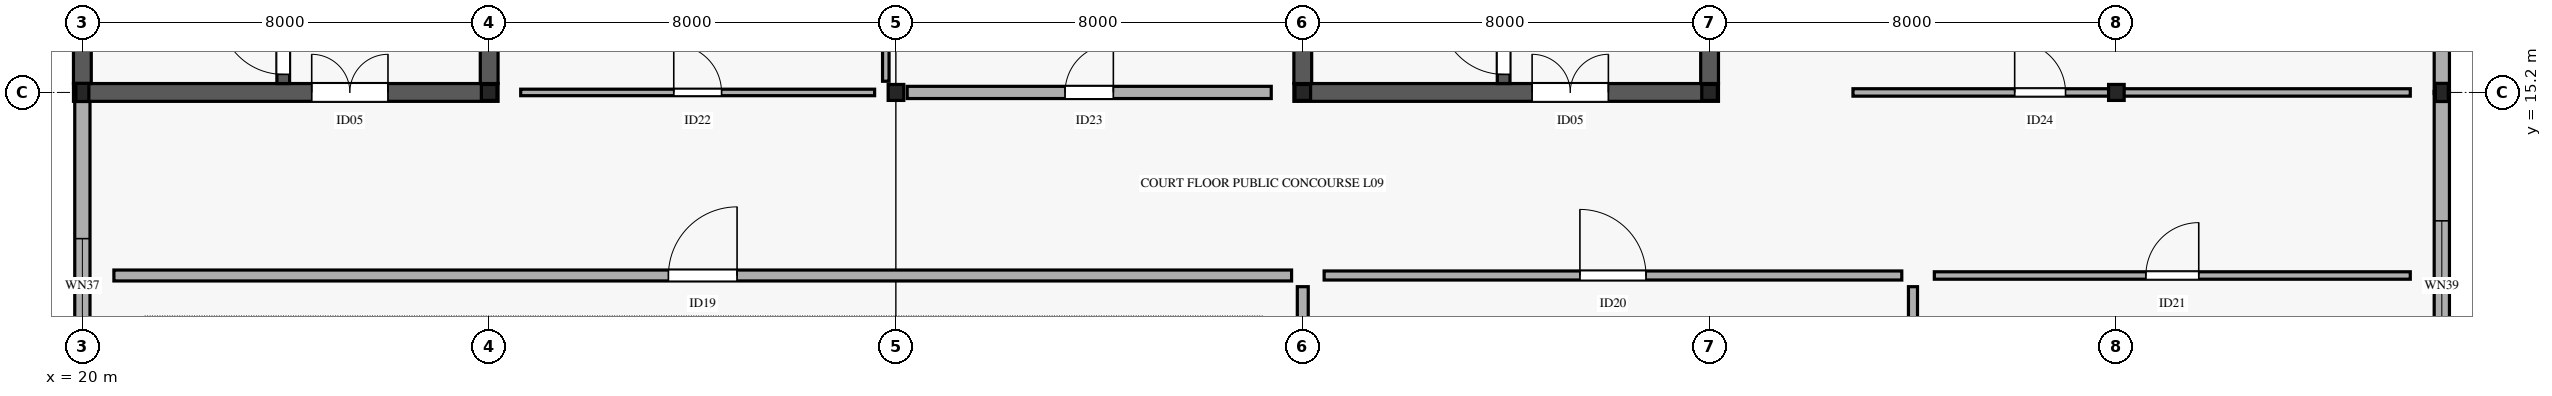
"""IFC4 building model, lengths in metres.
Left out: names, types, materials, properties, quantities, classifications, styles, units other than length and angle.
Written with IfcOpenShell. Run it as: python <this file> out.ifc"""

import sys

from ifc_helpers import new_model, si_unit, direction, frame, frame_2d, origin, origin_2d, place, context, subcontext, project, spatial, rectangle, i_section, extrude, element, fill, save


model = new_model("IFC4")
c1 = context("Model", 3, precision=1e-05, world=origin(), true_north=direction((0.0, 1.0)))
c2 = subcontext(c1, "Body", "Model", "MODEL_VIEW")
j1 = project(units=[si_unit("LENGTHUNIT", "METRE"), si_unit("PLANEANGLEUNIT", "RADIAN")], contexts=[c1])
p1 = place(None, origin())
s1 = spatial("IfcSite", under=j1, at=p1, CompositionType="ELEMENT")
p2 = place(p1, origin())
s2 = spatial("IfcBuilding", under=s1, at=p2, CompositionType="ELEMENT")
p3 = place(p2, frame((0.0, 0.0, 42.0)))
s3 = spatial("IfcBuildingStorey", under=s2, at=p3, CompositionType="ELEMENT", Elevation=42.0)
p4 = place(p3, frame((20.0, 15.2, 0.0), z_axis=(0.0, 0.0, 1.0), x_axis=(1.0, 0.0, 0.0)))
e1 = element("IfcColumn", 1, at=p4, inside=s3, PredefinedType="COLUMN", context=c2, shape_type="SweptSolid", body=[
    extrude(i_section(OverallWidth=0.255, OverallDepth=0.357, WebThickness=0.01, FlangeThickness=0.018, FilletRadius=0.015, at=origin_2d()), origin(), (0.0, 0.0, 1.0), 3.995),
])
for number, where, z_axis, x_axis in (
    (2, (28.0, 15.2, 0.0), (0.0, 0.0, 1.0), (1.0, 0.0, 0.0)),
    (3, (36.0, 15.2, 0.0), (0.0, 0.0, 1.0), (1.0, 0.0, 0.0)),
    (4, (44.0, 15.2, 0.0), (0.0, 0.0, 1.0), (1.0, 0.0, 0.0)),
    (5, (52.0, 15.2, 0.0), (0.0, 0.0, 1.0), (1.0, 0.0, 0.0)),
    (6, (60.0, 15.2, 0.0), (0.0, 0.0, 1.0), (1.0, 0.0, 0.0)),
):
    element("IfcColumn", number, at=place(p3, frame(where, z_axis=z_axis, x_axis=x_axis)), inside=s3, PredefinedType="COLUMN", context=c2, shape_type="SweptSolid", body=[
        extrude(i_section(OverallWidth=0.307, OverallDepth=0.314, WebThickness=0.012, FlangeThickness=0.019, FilletRadius=0.015, at=origin_2d()), origin(), (0.0, 0.0, 1.0), 3.995),
    ])
p5 = place(p3, frame((66.4, 15.2, 0.0), z_axis=(0.0, 0.0, 1.0), x_axis=(1.0, 0.0, 0.0)))
e7 = element("IfcColumn", 7, at=p5, inside=s3, PredefinedType="COLUMN", context=c2, shape_type="SweptSolid", body=[
    extrude(i_section(OverallWidth=0.255, OverallDepth=0.357, WebThickness=0.01, FlangeThickness=0.018, FilletRadius=0.015, at=origin_2d()), origin(), (0.0, 0.0, 1.0), 3.995),
])
p6 = place(p3, frame((20.0, 7.58, 0.0), z_axis=(0.0, 0.0, 1.0), x_axis=(0.0, 1.0, 0.0)))
e8 = element("IfcWall", 8, at=p6, inside=s3, PredefinedType="STANDARD", context=c2, shape_type="SweptSolid", body=[
    extrude(rectangle(XDim=7.64, YDim=0.3, at=frame_2d((3.82, 0.0))), origin(), (0.0, 0.0, 1.0), 3.06),
])
p7 = place(p6, frame((2.895, 0.0, 0.75)))
e9 = element("IfcOpeningElement", 9, at=p7, cuts=e8, PredefinedType="OPENING", context=c2, shape_type="SweptSolid", body=[
    extrude(rectangle(XDim=1.85, YDim=1.9, at=frame_2d((0.925, 0.95))), frame((0.0, 0.16, 0.0), z_axis=(0.0, -1.0, 0.0), x_axis=(1.0, 0.0, 0.0)), (0.0, 0.0, 1.0), 0.32),
])
p8 = place(p3, frame((66.4, 22.82, 0.0), z_axis=(0.0, 0.0, 1.0), x_axis=(0.0, -1.0, 0.0)))
e10 = element("IfcWall", 10, at=p8, inside=s3, PredefinedType="STANDARD", context=c2, shape_type="SweptSolid", body=[
    extrude(rectangle(XDim=7.64, YDim=0.3, at=frame_2d((3.82, 0.0))), origin(), (0.0, 0.0, 1.0), 3.06),
])
p9 = place(p8, frame((2.745, 0.0, 0.75)))
e11 = element("IfcOpeningElement", 11, at=p9, cuts=e10, PredefinedType="OPENING", context=c2, shape_type="SweptSolid", body=[
    extrude(rectangle(XDim=2.15, YDim=1.9, at=frame_2d((1.075, 0.95))), frame((0.0, 0.16, 0.0), z_axis=(0.0, -1.0, 0.0), x_axis=(1.0, 0.0, 0.0)), (0.0, 0.0, 1.0), 0.32),
])
p10 = place(p3, frame((66.4, 15.22, 0.0), z_axis=(0.0, 0.0, 1.0), x_axis=(0.0, -1.0, 0.0)))
e12 = element("IfcWall", 12, at=p10, inside=s3, PredefinedType="STANDARD", context=c2, shape_type="SweptSolid", body=[
    extrude(rectangle(XDim=7.64, YDim=0.3, at=frame_2d((3.82, 0.0))), origin(), (0.0, 0.0, 1.0), 3.06),
])
p11 = place(p10, frame((2.545, 0.0, 0.75)))
e13 = element("IfcOpeningElement", 13, at=p11, cuts=e12, PredefinedType="OPENING", context=c2, shape_type="SweptSolid", body=[
    extrude(rectangle(XDim=2.55, YDim=1.9, at=frame_2d((1.275, 0.95))), frame((0.0, 0.16, 0.0), z_axis=(0.0, -1.0, 0.0), x_axis=(1.0, 0.0, 0.0)), (0.0, 0.0, 1.0), 0.32),
])
p12 = place(p3, frame((19.825, 15.2, 0.0), z_axis=(0.0, 0.0, 1.0), x_axis=(1.0, 0.0, 0.0)))
e14 = element("IfcWall", 14, at=p12, inside=s3, PredefinedType="SHEAR", context=c2, shape_type="SweptSolid", body=[
    extrude(rectangle(XDim=8.35, YDim=0.35, at=frame_2d((4.175, 0.0))), origin(), (0.0, 0.0, 1.0), 3.99),
])
p13 = place(p12, frame((4.685, 0.0, 0.0)))
e15 = element("IfcOpeningElement", 15, at=p13, cuts=e14, PredefinedType="OPENING", context=c2, shape_type="SweptSolid", body=[
    extrude(rectangle(XDim=1.5, YDim=2.2, at=frame_2d((0.75, 1.1))), frame((0.0, 0.185, 0.0), z_axis=(0.0, -1.0, 0.0), x_axis=(1.0, 0.0, 0.0)), (0.0, 0.0, 1.0), 0.37),
])
for number, where, z_axis, x_axis in (
    (16, (20.0, 15.375, 0.0), (0.0, 0.0, 1.0), (0.0, 1.0, 0.0)),
    (17, (28.0, 15.375, 0.0), (0.0, 0.0, 1.0), (0.0, 1.0, 0.0)),
):
    element("IfcWall", number, at=place(p3, frame(where, z_axis=z_axis, x_axis=x_axis)), inside=s3, PredefinedType="SHEAR", context=c2, shape_type="SweptSolid", body=[
        extrude(rectangle(XDim=7.25, YDim=0.35, at=frame_2d((3.625, 0.0))), origin(), (0.0, 0.0, 1.0), 3.99),
    ])
p14 = place(p3, frame((23.95, 15.375, 0.0), z_axis=(0.0, 0.0, 1.0), x_axis=(0.0, 1.0, 0.0)))
e18 = element("IfcWall", 18, at=p14, inside=s3, PredefinedType="SHEAR", context=c2, shape_type="SweptSolid", body=[
    extrude(rectangle(XDim=7.25, YDim=0.25, at=frame_2d((3.625, 0.0))), origin(), (0.0, 0.0, 1.0), 3.99),
])
p15 = place(p14, frame((0.18, 0.0, 0.0)))
e19 = element("IfcOpeningElement", 19, at=p15, cuts=e18, PredefinedType="OPENING", context=c2, shape_type="SweptSolid", body=[
    extrude(rectangle(XDim=1.25, YDim=2.2, at=frame_2d((0.625, 1.1))), frame((0.0, 0.135, 0.0), z_axis=(0.0, -1.0, 0.0), x_axis=(1.0, 0.0, 0.0)), (0.0, 0.0, 1.0), 0.27),
])
p16 = place(p3, frame((43.825, 15.2, 0.0), z_axis=(0.0, 0.0, 1.0), x_axis=(1.0, 0.0, 0.0)))
e20 = element("IfcWall", 20, at=p16, inside=s3, PredefinedType="SHEAR", context=c2, shape_type="SweptSolid", body=[
    extrude(rectangle(XDim=8.35, YDim=0.35, at=frame_2d((4.175, 0.0))), origin(), (0.0, 0.0, 1.0), 3.99),
])
p17 = place(p16, frame((4.685, 0.0, 0.0)))
e21 = element("IfcOpeningElement", 21, at=p17, cuts=e20, PredefinedType="OPENING", context=c2, shape_type="SweptSolid", body=[
    extrude(rectangle(XDim=1.5, YDim=2.2, at=frame_2d((0.75, 1.1))), frame((0.0, 0.185, 0.0), z_axis=(0.0, -1.0, 0.0), x_axis=(1.0, 0.0, 0.0)), (0.0, 0.0, 1.0), 0.37),
])
for number, where, z_axis, x_axis in (
    (22, (44.0, 15.375, 0.0), (0.0, 0.0, 1.0), (0.0, 1.0, 0.0)),
    (23, (52.0, 15.375, 0.0), (0.0, 0.0, 1.0), (0.0, 1.0, 0.0)),
):
    element("IfcWall", number, at=place(p3, frame(where, z_axis=z_axis, x_axis=x_axis)), inside=s3, PredefinedType="SHEAR", context=c2, shape_type="SweptSolid", body=[
        extrude(rectangle(XDim=7.25, YDim=0.35, at=frame_2d((3.625, 0.0))), origin(), (0.0, 0.0, 1.0), 3.99),
    ])
p18 = place(p3, frame((47.95, 15.375, 0.0), z_axis=(0.0, 0.0, 1.0), x_axis=(0.0, 1.0, 0.0)))
e24 = element("IfcWall", 24, at=p18, inside=s3, PredefinedType="SHEAR", context=c2, shape_type="SweptSolid", body=[
    extrude(rectangle(XDim=7.25, YDim=0.25, at=frame_2d((3.625, 0.0))), origin(), (0.0, 0.0, 1.0), 3.99),
])
p19 = place(p18, frame((0.18, 0.0, 0.0)))
e25 = element("IfcOpeningElement", 25, at=p19, cuts=e24, PredefinedType="OPENING", context=c2, shape_type="SweptSolid", body=[
    extrude(rectangle(XDim=1.25, YDim=2.2, at=frame_2d((0.625, 1.1))), frame((0.0, 0.135, 0.0), z_axis=(0.0, -1.0, 0.0), x_axis=(1.0, 0.0, 0.0)), (0.0, 0.0, 1.0), 0.27),
])
p20 = place(p3, frame((20.62, 11.6, 0.0), z_axis=(0.0, 0.0, 1.0), x_axis=(1.0, 0.0, 0.0)))
e26 = element("IfcWall", 26, at=p20, inside=s3, PredefinedType="PARTITIONING", context=c2, shape_type="SweptSolid", body=[
    extrude(rectangle(XDim=23.16, YDim=0.215, at=frame_2d((11.58, 0.0))), origin(), (0.0, 0.0, 1.0), 2.85),
])
p21 = place(p20, frame((10.905, 0.0, 0.0)))
e27 = element("IfcOpeningElement", 27, at=p21, cuts=e26, PredefinedType="OPENING", context=c2, shape_type="SweptSolid", body=[
    extrude(rectangle(XDim=1.35, YDim=2.25, at=frame_2d((0.675, 1.125))), frame((0.0, 0.117, 0.0), z_axis=(0.0, -1.0, 0.0), x_axis=(1.0, 0.0, 0.0)), (0.0, 0.0, 1.0), 0.235),
])
p22 = place(p3, frame((44.0, 0.62, 0.0), z_axis=(0.0, 0.0, 1.0), x_axis=(0.0, 1.0, 0.0)))
e28 = element("IfcWall", 28, at=p22, inside=s3, PredefinedType="PARTITIONING", context=c2, shape_type="SweptSolid", body=[
    extrude(rectangle(XDim=10.76, YDim=0.215, at=frame_2d((5.38, 0.0))), origin(), (0.0, 0.0, 1.0), 2.85),
])
p23 = place(p3, frame((44.42, 11.6, 0.0), z_axis=(0.0, 0.0, 1.0), x_axis=(1.0, 0.0, 0.0)))
e29 = element("IfcWall", 29, at=p23, inside=s3, PredefinedType="PARTITIONING", context=c2, shape_type="SweptSolid", body=[
    extrude(rectangle(XDim=11.36, YDim=0.178, at=frame_2d((5.68, 0.0))), origin(), (0.0, 0.0, 1.0), 2.85),
])
p24 = place(p23, frame((5.03, 0.0, 0.0)))
e30 = element("IfcOpeningElement", 30, at=p24, cuts=e29, PredefinedType="OPENING", context=c2, shape_type="SweptSolid", body=[
    extrude(rectangle(XDim=1.3, YDim=2.2, at=frame_2d((0.65, 1.1))), frame((0.0, 0.099, 0.0), z_axis=(0.0, -1.0, 0.0), x_axis=(1.0, 0.0, 0.0)), (0.0, 0.0, 1.0), 0.198),
])
p25 = place(p3, frame((56.0, 0.62, 0.0), z_axis=(0.0, 0.0, 1.0), x_axis=(0.0, 1.0, 0.0)))
e31 = element("IfcWall", 31, at=p25, inside=s3, PredefinedType="PARTITIONING", context=c2, shape_type="SweptSolid", body=[
    extrude(rectangle(XDim=10.76, YDim=0.178, at=frame_2d((5.38, 0.0))), origin(), (0.0, 0.0, 1.0), 2.85),
])
p26 = place(p3, frame((56.42, 11.6, 0.0), z_axis=(0.0, 0.0, 1.0), x_axis=(1.0, 0.0, 0.0)))
e32 = element("IfcWall", 32, at=p26, inside=s3, PredefinedType="PARTITIONING", context=c2, shape_type="SweptSolid", body=[
    extrude(rectangle(XDim=9.36, YDim=0.146, at=frame_2d((4.68, 0.0))), origin(), (0.0, 0.0, 1.0), 2.85),
])
p27 = place(p26, frame((4.16, 0.0, 0.0)))
e33 = element("IfcOpeningElement", 33, at=p27, cuts=e32, PredefinedType="OPENING", context=c2, shape_type="SweptSolid", body=[
    extrude(rectangle(XDim=1.04, YDim=2.2, at=frame_2d((0.52, 1.1))), frame((0.0, 0.083, 0.0), z_axis=(0.0, -1.0, 0.0), x_axis=(1.0, 0.0, 0.0)), (0.0, 0.0, 1.0), 0.166),
])
p28 = place(p3, frame((28.62, 15.2, 0.0), z_axis=(0.0, 0.0, 1.0), x_axis=(1.0, 0.0, 0.0)))
e34 = element("IfcWall", 34, at=p28, inside=s3, PredefinedType="PARTITIONING", context=c2, shape_type="SweptSolid", body=[
    extrude(rectangle(XDim=6.96, YDim=0.128, at=frame_2d((3.48, 0.0))), origin(), (0.0, 0.0, 1.0), 2.85),
])
p29 = place(p28, frame((3.01, 0.0, 0.0)))
e35 = element("IfcOpeningElement", 35, at=p29, cuts=e34, PredefinedType="OPENING", context=c2, shape_type="SweptSolid", body=[
    extrude(rectangle(XDim=0.94, YDim=2.2, at=frame_2d((0.47, 1.1))), frame((0.0, 0.074, 0.0), z_axis=(0.0, -1.0, 0.0), x_axis=(1.0, 0.0, 0.0)), (0.0, 0.0, 1.0), 0.148),
])
p30 = place(p3, frame((35.8, 15.42, 0.0), z_axis=(0.0, 0.0, 1.0), x_axis=(0.0, 1.0, 0.0)))
e36 = element("IfcWall", 36, at=p30, inside=s3, PredefinedType="PARTITIONING", context=c2, shape_type="SweptSolid", body=[
    extrude(rectangle(XDim=6.76, YDim=0.128, at=frame_2d((3.38, 0.0))), origin(), (0.0, 0.0, 1.0), 2.85),
])
p31 = place(p3, frame((36.22, 15.2, 0.0), z_axis=(0.0, 0.0, 1.0), x_axis=(1.0, 0.0, 0.0)))
e37 = element("IfcWall", 37, at=p31, inside=s3, PredefinedType="PARTITIONING", context=c2, shape_type="SweptSolid", body=[
    extrude(rectangle(XDim=7.16, YDim=0.24, at=frame_2d((3.58, 0.0))), origin(), (0.0, 0.0, 1.0), 2.85),
])
p32 = place(p31, frame((3.105, 0.0, 0.0)))
e38 = element("IfcOpeningElement", 38, at=p32, cuts=e37, PredefinedType="OPENING", context=c2, shape_type="SweptSolid", body=[
    extrude(rectangle(XDim=0.95, YDim=2.15, at=frame_2d((0.475, 1.075))), frame((0.0, 0.13, 0.0), z_axis=(0.0, -1.0, 0.0), x_axis=(1.0, 0.0, 0.0)), (0.0, 0.0, 1.0), 0.26),
])
p33 = place(p3, frame((54.82, 15.2, 0.0), z_axis=(0.0, 0.0, 1.0), x_axis=(1.0, 0.0, 0.0)))
e39 = element("IfcWall", 39, at=p33, inside=s3, PredefinedType="PARTITIONING", context=c2, shape_type="SweptSolid", body=[
    extrude(rectangle(XDim=10.96, YDim=0.146, at=frame_2d((5.48, 0.0))), origin(), (0.0, 0.0, 1.0), 2.85),
])
p34 = place(p33, frame((3.18, 0.0, 0.0)))
e40 = element("IfcOpeningElement", 40, at=p34, cuts=e39, PredefinedType="OPENING", context=c2, shape_type="SweptSolid", body=[
    extrude(rectangle(XDim=1.0, YDim=2.15, at=frame_2d((0.5, 1.075))), frame((0.0, 0.083, 0.0), z_axis=(0.0, -1.0, 0.0), x_axis=(1.0, 0.0, 0.0)), (0.0, 0.0, 1.0), 0.166),
])
p35 = place(p7, origin())
e41 = element("IfcWindow", 41, at=p35, inside=s3, PartitioningType="SINGLE_PANEL", PredefinedType="WINDOW", context=c2, shape_type="SweptSolid", body=[
    extrude(rectangle(XDim=1.85, YDim=1.9, at=frame_2d((0.925, 0.95))), frame((0.0, 0.03, 0.0), z_axis=(0.0, -1.0, 0.0), x_axis=(1.0, 0.0, 0.0)), (0.0, 0.0, 1.0), 0.06),
])
fill(e9, e41)
p36 = place(p11, origin())
e42 = element("IfcWindow", 42, at=p36, inside=s3, PartitioningType="SINGLE_PANEL", PredefinedType="WINDOW", context=c2, shape_type="SweptSolid", body=[
    extrude(rectangle(XDim=2.55, YDim=1.9, at=frame_2d((1.275, 0.95))), frame((0.0, 0.03, 0.0), z_axis=(0.0, -1.0, 0.0), x_axis=(1.0, 0.0, 0.0)), (0.0, 0.0, 1.0), 0.06),
])
fill(e13, e42)
p37 = place(p15, origin())
e43 = element("IfcDoor", 43, at=p37, inside=s3, OperationType="SINGLE_SWING_RIGHT", PredefinedType="DOOR", context=c2, shape_type="SweptSolid", body=[
    extrude(rectangle(XDim=1.25, YDim=2.2, at=frame_2d((0.625, 1.1))), frame((0.0, 0.025, 0.0), z_axis=(0.0, -1.0, 0.0), x_axis=(1.0, 0.0, 0.0)), (0.0, 0.0, 1.0), 0.05),
])
fill(e19, e43)
p38 = place(p13, origin())
e44 = element("IfcDoor", 44, at=p38, inside=s3, OperationType="DOUBLE_DOOR_SINGLE_SWING", PredefinedType="DOOR", context=c2, shape_type="SweptSolid", body=[
    extrude(rectangle(XDim=1.5, YDim=2.2, at=frame_2d((0.75, 1.1))), frame((0.0, 0.025, 0.0), z_axis=(0.0, -1.0, 0.0), x_axis=(1.0, 0.0, 0.0)), (0.0, 0.0, 1.0), 0.05),
])
fill(e15, e44)
p39 = place(p19, origin())
e45 = element("IfcDoor", 45, at=p39, inside=s3, OperationType="SINGLE_SWING_RIGHT", PredefinedType="DOOR", context=c2, shape_type="SweptSolid", body=[
    extrude(rectangle(XDim=1.25, YDim=2.2, at=frame_2d((0.625, 1.1))), frame((0.0, 0.025, 0.0), z_axis=(0.0, -1.0, 0.0), x_axis=(1.0, 0.0, 0.0)), (0.0, 0.0, 1.0), 0.05),
])
fill(e25, e45)
p40 = place(p17, origin())
e46 = element("IfcDoor", 46, at=p40, inside=s3, OperationType="DOUBLE_DOOR_SINGLE_SWING", PredefinedType="DOOR", context=c2, shape_type="SweptSolid", body=[
    extrude(rectangle(XDim=1.5, YDim=2.2, at=frame_2d((0.75, 1.1))), frame((0.0, 0.025, 0.0), z_axis=(0.0, -1.0, 0.0), x_axis=(1.0, 0.0, 0.0)), (0.0, 0.0, 1.0), 0.05),
])
fill(e21, e46)
p41 = place(p21, origin())
e47 = element("IfcDoor", 47, at=p41, inside=s3, OperationType="SINGLE_SWING_RIGHT", PredefinedType="DOOR", context=c2, shape_type="SweptSolid", body=[
    extrude(rectangle(XDim=1.35, YDim=2.25, at=frame_2d((0.675, 1.125))), frame((0.0, 0.025, 0.0), z_axis=(0.0, -1.0, 0.0), x_axis=(1.0, 0.0, 0.0)), (0.0, 0.0, 1.0), 0.05),
])
fill(e27, e47)
p42 = place(p24, origin())
e48 = element("IfcDoor", 48, at=p42, inside=s3, OperationType="SINGLE_SWING_LEFT", PredefinedType="DOOR", context=c2, shape_type="SweptSolid", body=[
    extrude(rectangle(XDim=1.3, YDim=2.2, at=frame_2d((0.65, 1.1))), frame((0.0, 0.025, 0.0), z_axis=(0.0, -1.0, 0.0), x_axis=(1.0, 0.0, 0.0)), (0.0, 0.0, 1.0), 0.05),
])
fill(e30, e48)
p43 = place(p27, origin())
e49 = element("IfcDoor", 49, at=p43, inside=s3, OperationType="SINGLE_SWING_RIGHT", PredefinedType="DOOR", context=c2, shape_type="SweptSolid", body=[
    extrude(rectangle(XDim=1.04, YDim=2.2, at=frame_2d((0.52, 1.1))), frame((0.0, 0.025, 0.0), z_axis=(0.0, -1.0, 0.0), x_axis=(1.0, 0.0, 0.0)), (0.0, 0.0, 1.0), 0.05),
])
fill(e33, e49)
p44 = place(p29, origin())
e50 = element("IfcDoor", 50, at=p44, inside=s3, OperationType="SINGLE_SWING_LEFT", PredefinedType="DOOR", context=c2, shape_type="SweptSolid", body=[
    extrude(rectangle(XDim=0.94, YDim=2.2, at=frame_2d((0.47, 1.1))), frame((0.0, 0.025, 0.0), z_axis=(0.0, -1.0, 0.0), x_axis=(1.0, 0.0, 0.0)), (0.0, 0.0, 1.0), 0.05),
])
fill(e35, e50)
p45 = place(p32, origin())
e51 = element("IfcDoor", 51, at=p45, inside=s3, OperationType="SINGLE_SWING_RIGHT", PredefinedType="DOOR", context=c2, shape_type="SweptSolid", body=[
    extrude(rectangle(XDim=0.95, YDim=2.15, at=frame_2d((0.475, 1.075))), frame((0.0, 0.025, 0.0), z_axis=(0.0, -1.0, 0.0), x_axis=(1.0, 0.0, 0.0)), (0.0, 0.0, 1.0), 0.05),
])
fill(e38, e51)
p46 = place(p34, origin())
e52 = element("IfcDoor", 52, at=p46, inside=s3, OperationType="SINGLE_SWING_LEFT", PredefinedType="DOOR", context=c2, shape_type="SweptSolid", body=[
    extrude(rectangle(XDim=1.0, YDim=2.15, at=frame_2d((0.5, 1.075))), frame((0.0, 0.025, 0.0), z_axis=(0.0, -1.0, 0.0), x_axis=(1.0, 0.0, 0.0)), (0.0, 0.0, 1.0), 0.05),
])
fill(e40, e52)
save(model, sys.argv[1])
